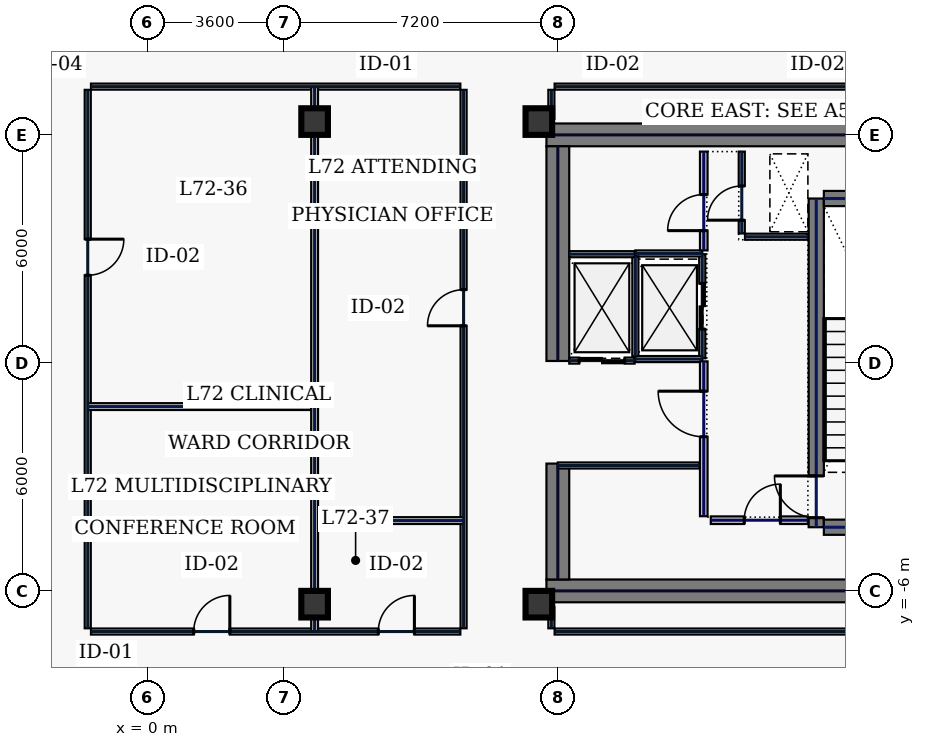
"""IFC4 building model, lengths in metres.
Left out: names, types, materials, properties, quantities, classifications, styles, units other than length and angle.
Written with IfcOpenShell. Run it as: python <this file> out.ifc"""

import sys

from ifc_helpers import new_model, si_unit, direction, frame, frame_2d, origin, origin_2d, place, context, subcontext, project, spatial, rectangle, hollow_rectangle, extrude, element, fill, save


model = new_model("IFC4")
c1 = context("Model", 3, precision=1e-05, world=origin(), true_north=direction((0.0, 1.0)))
c2 = subcontext(c1, "Body", "Model", "MODEL_VIEW")
j1 = project(units=[si_unit("LENGTHUNIT", "METRE"), si_unit("PLANEANGLEUNIT", "RADIAN")], contexts=[c1])
p1 = place(None, origin())
s1 = spatial("IfcSite", under=j1, at=p1, CompositionType="ELEMENT")
p2 = place(p1, origin())
s2 = spatial("IfcBuilding", under=s1, at=p2, CompositionType="ELEMENT")
p3 = place(p2, frame((0.0, 0.0, 309.0)))
s3 = spatial("IfcBuildingStorey", under=s2, at=p3, CompositionType="ELEMENT", Elevation=309.0)
for number, where, z_axis, x_axis in (
    (1, (10.5, 6.0, 0.0), (0.0, 0.0, 1.0), (1.0, 0.0, 0.0)),
    (2, (10.5, -6.0, 0.0), (0.0, 0.0, 1.0), (1.0, 0.0, 0.0)),
):
    element("IfcWall", number, at=place(p3, frame(where, z_axis=z_axis, x_axis=x_axis)), inside=s3, PredefinedType="SHEAR", context=c2, shape_type="SweptSolid", body=[
        extrude(rectangle(XDim=11.5, YDim=0.6, at=frame_2d((5.75, 0.0))), origin(), (0.0, 0.0, 1.0), 3.74),
    ])
p4 = place(p3, frame((10.8, -5.7, 0.0), z_axis=(0.0, 0.0, 1.0), x_axis=(0.0, 1.0, 0.0)))
e3 = element("IfcWall", 3, at=p4, inside=s3, PredefinedType="SHEAR", context=c2, shape_type="SweptSolid", body=[
    extrude(rectangle(XDim=3.05, YDim=0.6, at=frame_2d((1.525, 0.0))), origin(), (0.0, 0.0, 1.0), 3.74),
])
p5 = place(p3, frame((10.8, 0.05, 0.0), z_axis=(0.0, 0.0, 1.0), x_axis=(0.0, 1.0, 0.0)))
e4 = element("IfcWall", 4, at=p5, inside=s3, PredefinedType="SHEAR", context=c2, shape_type="SweptSolid", body=[
    extrude(rectangle(XDim=5.65, YDim=0.6, at=frame_2d((2.825, 0.0))), origin(), (0.0, 0.0, 1.0), 3.74),
])
p6 = place(p3, frame((17.6, -4.325, 0.0), z_axis=(0.0, 0.0, 1.0), x_axis=(0.0, 1.0, 0.0)))
e5 = element("IfcWall", 5, at=p6, inside=s3, PredefinedType="SHEAR", context=c2, shape_type="SweptSolid", body=[
    extrude(rectangle(XDim=8.65, YDim=0.4, at=frame_2d((4.325, 0.0))), origin(), (0.0, 0.0, 1.0), 3.74),
])
p7 = place(p6, frame((0.25, 0.0, 0.0)))
e6 = element("IfcOpeningElement", 6, at=p7, cuts=e5, PredefinedType="OPENING", context=c2, shape_type="SweptSolid", body=[
    extrude(rectangle(XDim=1.1, YDim=2.2, at=frame_2d((0.55, 1.1))), frame((0.0, 0.21, 0.0), z_axis=(0.0, -1.0, 0.0), x_axis=(1.0, 0.0, 0.0)), (0.0, 0.0, 1.0), 0.42),
])
for number, where, z_axis, x_axis in (
    (7, (17.8, -4.325, 0.0), (0.0, 0.0, 1.0), (1.0, 0.0, 0.0)),
    (8, (17.8, 4.325, 0.0), (0.0, 0.0, 1.0), (1.0, 0.0, 0.0)),
):
    element("IfcWall", number, at=place(p3, frame(where, z_axis=z_axis, x_axis=x_axis)), inside=s3, PredefinedType="SHEAR", context=c2, shape_type="SweptSolid", body=[
        extrude(rectangle(XDim=3.4, YDim=0.4, at=frame_2d((1.7, 0.0))), origin(), (0.0, 0.0, 1.0), 3.74),
    ])
for number, where, z_axis, x_axis in (
    (9, (10.3, -6.35, 0.0), (0.0, 0.0, 1.0), (1.0, 0.0, 0.0)),
    (10, (10.3, 6.35, 0.0), (0.0, 0.0, 1.0), (1.0, 0.0, 0.0)),
    (11, (4.4, -6.35, 0.0), (0.0, 0.0, 1.0), (1.0, 0.0, 0.0)),
    (12, (4.4, 6.35, 0.0), (0.0, 0.0, 1.0), (1.0, 0.0, 0.0)),
):
    element("IfcColumn", number, at=place(p3, frame(where, z_axis=z_axis, x_axis=x_axis)), inside=s3, PredefinedType="COLUMN", context=c2, shape_type="SweptSolid", body=[
        extrude(hollow_rectangle(XDim=0.7, YDim=0.7, WallThickness=0.032, at=origin_2d()), origin(), (0.0, 0.0, 1.0), 3.74),
    ])
p8 = place(p3, frame((14.6, 0.12, 0.0), z_axis=(0.0, 0.0, 1.0), x_axis=(0.0, 1.0, 0.0)))
e13 = element("IfcWall", 13, at=p8, inside=s3, PredefinedType="PARTITIONING", context=c2, shape_type="SweptSolid", body=[
    extrude(rectangle(XDim=2.74, YDim=0.16, at=frame_2d((1.37, 0.0))), origin(), (0.0, 0.0, 1.0), 3.74),
])
p9 = place(p8, frame((0.77, 0.0, 0.0)))
e14 = element("IfcOpeningElement", 14, at=p9, cuts=e13, PredefinedType="OPENING", context=c2, shape_type="SweptSolid", body=[
    extrude(rectangle(XDim=1.2, YDim=2.2, at=frame_2d((0.6, 1.1))), frame((0.0, 0.09, 0.0), z_axis=(0.0, -1.0, 0.0), x_axis=(1.0, 0.0, 0.0)), (0.0, 0.0, 1.0), 0.18),
])
for number, where, z_axis, x_axis in (
    (15, (12.84, 0.1, 0.0), (0.0, 0.0, 1.0), (1.0, 0.0, 0.0)),
    (16, (12.84, 2.88, 0.0), (0.0, 0.0, 1.0), (1.0, 0.0, 0.0)),
):
    element("IfcWall", number, at=place(p3, frame(where, z_axis=z_axis, x_axis=x_axis)), inside=s3, PredefinedType="PARTITIONING", context=c2, shape_type="SweptSolid", body=[
        extrude(rectangle(XDim=1.76, YDim=0.16, at=frame_2d((0.88, 0.0))), origin(), (0.0, 0.0, 1.0), 3.74),
    ])
p10 = place(p3, frame((12.84, 0.18, 0.0), z_axis=(0.0, 0.0, 1.0), x_axis=(0.0, 1.0, 0.0)))
e17 = element("IfcWall", 17, at=p10, inside=s3, PredefinedType="PARTITIONING", context=c2, shape_type="SweptSolid", body=[
    extrude(rectangle(XDim=2.62, YDim=0.16, at=frame_2d((1.31, 0.0))), origin(), (0.0, 0.0, 1.0), 3.74),
])
p11 = place(p3, frame((11.1, 0.06, 0.0), z_axis=(0.0, 0.0, 1.0), x_axis=(1.0, 0.0, 0.0)))
e18 = element("IfcWall", 18, at=p11, inside=s3, PredefinedType="PARTITIONING", context=c2, shape_type="SweptSolid", body=[
    extrude(rectangle(XDim=1.72, YDim=0.16, at=frame_2d((0.86, 0.0))), origin(), (0.0, 0.0, 1.0), 3.74),
])
p12 = place(p11, frame((0.26, 0.0, 0.0)))
e19 = element("IfcOpeningElement", 19, at=p12, cuts=e18, PredefinedType="OPENING", context=c2, shape_type="SweptSolid", body=[
    extrude(rectangle(XDim=1.2, YDim=2.2, at=frame_2d((0.6, 1.1))), frame((0.0, 0.09, 0.0), z_axis=(0.0, -1.0, 0.0), x_axis=(1.0, 0.0, 0.0)), (0.0, 0.0, 1.0), 0.18),
])
p13 = place(p3, frame((11.1, 2.86, 0.0), z_axis=(0.0, 0.0, 1.0), x_axis=(1.0, 0.0, 0.0)))
e20 = element("IfcWall", 20, at=p13, inside=s3, PredefinedType="PARTITIONING", context=c2, shape_type="SweptSolid", body=[
    extrude(rectangle(XDim=1.72, YDim=0.16, at=frame_2d((0.86, 0.0))), origin(), (0.0, 0.0, 1.0), 3.74),
])
p14 = place(p3, frame((15.64, 3.405, 0.0), z_axis=(0.0, 0.0, 1.0), x_axis=(0.0, 1.0, 0.0)))
e21 = element("IfcWall", 21, at=p14, inside=s3, PredefinedType="PARTITIONING", context=c2, shape_type="SweptSolid", body=[
    extrude(rectangle(XDim=2.155, YDim=0.16, at=frame_2d((1.078, 0.0))), origin(), (0.0, 0.0, 1.0), 3.74),
])
p15 = place(p14, frame((0.35, 0.0, 0.0)))
e22 = element("IfcOpeningElement", 22, at=p15, cuts=e21, PredefinedType="OPENING", context=c2, shape_type="SweptSolid", body=[
    extrude(rectangle(XDim=0.9, YDim=2.2, at=frame_2d((0.45, 1.1))), frame((0.0, 0.09, 0.0), z_axis=(0.0, -1.0, 0.0), x_axis=(1.0, 0.0, 0.0)), (0.0, 0.0, 1.0), 0.18),
])
p16 = place(p3, frame((15.725, 3.32, 0.0), z_axis=(0.0, 0.0, 1.0), x_axis=(1.0, 0.0, 0.0)))
e23 = element("IfcWall", 23, at=p16, inside=s3, PredefinedType="PARTITIONING", context=c2, shape_type="SweptSolid", body=[
    extrude(rectangle(XDim=1.655, YDim=0.16, at=frame_2d((0.827, 0.0))), origin(), (0.0, 0.0, 1.0), 3.74),
])
p17 = place(p3, frame((14.825, -4.14, 0.0), z_axis=(0.0, 0.0, 1.0), x_axis=(1.0, 0.0, 0.0)))
e24 = element("IfcWall", 24, at=p17, inside=s3, PredefinedType="SOLIDWALL", context=c2, shape_type="SweptSolid", body=[
    extrude(rectangle(XDim=2.555, YDim=0.2, at=frame_2d((1.277, 0.0))), origin(), (0.0, 0.0, 1.0), 3.74),
])
p18 = place(p17, frame((0.88, 0.0, 0.0)))
e25 = element("IfcOpeningElement", 25, at=p18, cuts=e24, PredefinedType="OPENING", context=c2, shape_type="SweptSolid", body=[
    extrude(rectangle(XDim=0.95, YDim=2.2, at=frame_2d((0.475, 1.1))), frame((0.0, 0.11, 0.0), z_axis=(0.0, -1.0, 0.0), x_axis=(1.0, 0.0, 0.0)), (0.0, 0.0, 1.0), 0.22),
])
p19 = place(p3, frame((10.8, -2.7, 0.0), z_axis=(0.0, 0.0, 1.0), x_axis=(1.0, 0.0, 0.0)))
e26 = element("IfcWall", 26, at=p19, inside=s3, PredefinedType="PARTITIONING", context=c2, shape_type="SweptSolid", body=[
    extrude(rectangle(XDim=3.735, YDim=0.16, at=frame_2d((1.867, 0.0))), origin(), (0.0, 0.0, 1.0), 3.74),
])
p20 = place(p3, frame((14.64, 2.96, 0.0), z_axis=(0.0, 0.0, 1.0), x_axis=(0.0, 1.0, 0.0)))
e27 = element("IfcWall", 27, at=p20, inside=s3, PredefinedType="SOLIDWALL", context=c2, shape_type="SweptSolid", body=[
    extrude(rectangle(XDim=2.6, YDim=0.2, at=frame_2d((1.3, 0.0))), origin(), (0.0, 0.0, 1.0), 3.74),
])
p21 = place(p20, frame((0.52, 0.0, 0.0)))
e28 = element("IfcOpeningElement", 28, at=p21, cuts=e27, PredefinedType="OPENING", context=c2, shape_type="SweptSolid", body=[
    extrude(rectangle(XDim=0.95, YDim=2.2, at=frame_2d((0.475, 1.1))), frame((0.0, 0.11, 0.0), z_axis=(0.0, -1.0, 0.0), x_axis=(1.0, 0.0, 0.0)), (0.0, 0.0, 1.0), 0.22),
])
p22 = place(p3, frame((14.64, -4.035, 0.0), z_axis=(0.0, 0.0, 1.0), x_axis=(0.0, 1.0, 0.0)))
e29 = element("IfcWall", 29, at=p22, inside=s3, PredefinedType="SOLIDWALL", context=c2, shape_type="SweptSolid", body=[
    extrude(rectangle(XDim=4.075, YDim=0.2, at=frame_2d((2.038, 0.0))), origin(), (0.0, 0.0, 1.0), 3.74),
])
p23 = place(p22, frame((2.09, 0.0, 0.0)))
e30 = element("IfcOpeningElement", 30, at=p23, cuts=e29, PredefinedType="OPENING", context=c2, shape_type="SweptSolid", body=[
    extrude(rectangle(XDim=1.2, YDim=2.2, at=frame_2d((0.6, 1.1))), frame((0.0, 0.11, 0.0), z_axis=(0.0, -1.0, 0.0), x_axis=(1.0, 0.0, 0.0)), (0.0, 0.0, 1.0), 0.22),
])
p24 = place(p3, frame((21.915, 7.27, 0.0), z_axis=(0.0, 0.0, 1.0), x_axis=(-1.0, 0.0, 0.0)))
e31 = element("IfcWall", 31, at=p24, inside=s3, PredefinedType="PARTITIONING", context=c2, shape_type="SweptSolid", body=[
    extrude(rectangle(XDim=11.2, YDim=0.16, at=frame_2d((5.6, 0.0))), origin(), (0.0, 0.0, 1.0), 3.74),
])
p25 = place(p3, frame((10.63, 7.185, 0.0), z_axis=(0.0, 0.0, 1.0), x_axis=(0.0, -1.0, 0.0)))
e32 = element("IfcWall", 32, at=p25, inside=s3, PredefinedType="PARTITIONING", context=c2, shape_type="SweptSolid", body=[
    extrude(rectangle(XDim=0.765, YDim=0.16, at=frame_2d((0.383, 0.0))), origin(), (0.0, 0.0, 1.0), 3.74),
])
p26 = place(p3, frame((10.63, -6.42, 0.0), z_axis=(0.0, 0.0, 1.0), x_axis=(0.0, -1.0, 0.0)))
e33 = element("IfcWall", 33, at=p26, inside=s3, PredefinedType="PARTITIONING", context=c2, shape_type="SweptSolid", body=[
    extrude(rectangle(XDim=0.565, YDim=0.16, at=frame_2d((0.283, 0.0))), origin(), (0.0, 0.0, 1.0), 3.74),
])
p27 = place(p3, frame((10.715, -7.07, 0.0), z_axis=(0.0, 0.0, 1.0), x_axis=(1.0, 0.0, 0.0)))
e34 = element("IfcWall", 34, at=p27, inside=s3, PredefinedType="PARTITIONING", context=c2, shape_type="SweptSolid", body=[
    extrude(rectangle(XDim=11.2, YDim=0.16, at=frame_2d((5.6, 0.0))), origin(), (0.0, 0.0, 1.0), 3.74),
])
p28 = place(p3, frame((8.235, 7.27, 0.0), z_axis=(0.0, 0.0, 1.0), x_axis=(-1.0, 0.0, 0.0)))
e35 = element("IfcWall", 35, at=p28, inside=s3, PredefinedType="PARTITIONING", context=c2, shape_type="SweptSolid", body=[
    extrude(rectangle(XDim=9.72, YDim=0.16, at=frame_2d((4.86, 0.0))), origin(), (0.0, 0.0, 1.0), 3.74),
])
p29 = place(p3, frame((-1.57, 7.185, 0.0), z_axis=(0.0, 0.0, 1.0), x_axis=(0.0, -1.0, 0.0)))
e36 = element("IfcWall", 36, at=p29, inside=s3, PredefinedType="PARTITIONING", context=c2, shape_type="SweptSolid", body=[
    extrude(rectangle(XDim=14.17, YDim=0.16, at=frame_2d((7.085, 0.0))), origin(), (0.0, 0.0, 1.0), 3.74),
])
p30 = place(p29, frame((3.929, 0.0, 0.0)))
e37 = element("IfcOpeningElement", 37, at=p30, cuts=e36, PredefinedType="OPENING", context=c2, shape_type="SweptSolid", body=[
    extrude(rectangle(XDim=0.95, YDim=2.2, at=frame_2d((0.475, 1.1))), frame((0.0, 0.09, 0.0), z_axis=(0.0, -1.0, 0.0), x_axis=(1.0, 0.0, 0.0)), (0.0, 0.0, 1.0), 0.18),
])
p31 = place(p3, frame((-1.485, -7.07, 0.0), z_axis=(0.0, 0.0, 1.0), x_axis=(1.0, 0.0, 0.0)))
e38 = element("IfcWall", 38, at=p31, inside=s3, PredefinedType="PARTITIONING", context=c2, shape_type="SweptSolid", body=[
    extrude(rectangle(XDim=9.72, YDim=0.16, at=frame_2d((4.86, 0.0))), origin(), (0.0, 0.0, 1.0), 3.74),
])
p32 = place(p31, frame((2.704, 0.0, 0.0)))
e39 = element("IfcOpeningElement", 39, at=p32, cuts=e38, PredefinedType="OPENING", context=c2, shape_type="SweptSolid", body=[
    extrude(rectangle(XDim=0.95, YDim=2.2, at=frame_2d((0.475, 1.1))), frame((0.0, 0.09, 0.0), z_axis=(0.0, -1.0, 0.0), x_axis=(1.0, 0.0, 0.0)), (0.0, 0.0, 1.0), 0.18),
])
p33 = place(p31, frame((7.561, 0.0, 0.0)))
e40 = element("IfcOpeningElement", 40, at=p33, cuts=e38, PredefinedType="OPENING", context=c2, shape_type="SweptSolid", body=[
    extrude(rectangle(XDim=0.95, YDim=2.2, at=frame_2d((0.475, 1.1))), frame((0.0, 0.09, 0.0), z_axis=(0.0, -1.0, 0.0), x_axis=(1.0, 0.0, 0.0)), (0.0, 0.0, 1.0), 0.18),
])
p34 = place(p3, frame((8.32, -6.985, 0.0), z_axis=(0.0, 0.0, 1.0), x_axis=(0.0, 1.0, 0.0)))
e41 = element("IfcWall", 41, at=p34, inside=s3, PredefinedType="PARTITIONING", context=c2, shape_type="SweptSolid", body=[
    extrude(rectangle(XDim=14.17, YDim=0.16, at=frame_2d((7.085, 0.0))), origin(), (0.0, 0.0, 1.0), 3.74),
])
p35 = place(p34, frame((7.961, 0.0, 0.0)))
e42 = element("IfcOpeningElement", 42, at=p35, cuts=e41, PredefinedType="OPENING", context=c2, shape_type="SweptSolid", body=[
    extrude(rectangle(XDim=0.95, YDim=2.2, at=frame_2d((0.475, 1.1))), frame((0.0, 0.09, 0.0), z_axis=(0.0, -1.0, 0.0), x_axis=(1.0, 0.0, 0.0)), (0.0, 0.0, 1.0), 0.18),
])
p36 = place(p3, frame((4.4, -7.065, 0.0), z_axis=(0.0, 0.0, 1.0), x_axis=(0.0, 1.0, 0.0)))
e43 = element("IfcWall", 43, at=p36, inside=s3, PredefinedType="PARTITIONING", context=c2, shape_type="SweptSolid", body=[
    extrude(rectangle(XDim=14.33, YDim=0.18, at=frame_2d((7.165, 0.0))), origin(), (0.0, 0.0, 1.0), 1.535),
])
p37 = place(p3, frame((-1.565, -1.15, 0.0), z_axis=(0.0, 0.0, 1.0), x_axis=(1.0, 0.0, 0.0)))
e44 = element("IfcWall", 44, at=p37, inside=s3, PredefinedType="PARTITIONING", context=c2, shape_type="SweptSolid", body=[
    extrude(rectangle(XDim=5.87, YDim=0.18, at=frame_2d((2.935, 0.0))), origin(), (0.0, 0.0, 1.0), 3.74),
])
p38 = place(p3, frame((4.495, -4.15, 0.0), z_axis=(0.0, 0.0, 1.0), x_axis=(1.0, 0.0, 0.0)))
e45 = element("IfcWall", 45, at=p38, inside=s3, PredefinedType="PARTITIONING", context=c2, shape_type="SweptSolid", body=[
    extrude(rectangle(XDim=3.82, YDim=0.18, at=frame_2d((1.91, 0.0))), origin(), (0.0, 0.0, 1.0), 3.74),
])
p39 = place(p7, origin())
e46 = element("IfcDoor", 46, at=p39, inside=s3, OperationType="SINGLE_SWING_RIGHT", PredefinedType="DOOR", context=c2, shape_type="SweptSolid", body=[
    extrude(rectangle(XDim=1.1, YDim=2.2, at=frame_2d((0.55, 1.1))), frame((0.0, 0.025, 0.0), z_axis=(0.0, -1.0, 0.0), x_axis=(1.0, 0.0, 0.0)), (0.0, 0.0, 1.0), 0.05),
])
fill(e6, e46)
p40 = place(p9, origin())
e47 = element("IfcDoor", 47, at=p40, inside=s3, OperationType="SLIDING_TO_LEFT", PredefinedType="DOOR", context=c2, shape_type="SweptSolid", body=[
    extrude(rectangle(XDim=1.2, YDim=2.2, at=frame_2d((0.6, 1.1))), frame((0.0, 0.025, 0.0), z_axis=(0.0, -1.0, 0.0), x_axis=(1.0, 0.0, 0.0)), (0.0, 0.0, 1.0), 0.05),
])
fill(e14, e47)
p41 = place(p12, origin())
e48 = element("IfcDoor", 48, at=p41, inside=s3, OperationType="SLIDING_TO_LEFT", PredefinedType="DOOR", context=c2, shape_type="SweptSolid", body=[
    extrude(rectangle(XDim=1.2, YDim=2.2, at=frame_2d((0.6, 1.1))), frame((0.0, 0.025, 0.0), z_axis=(0.0, -1.0, 0.0), x_axis=(1.0, 0.0, 0.0)), (0.0, 0.0, 1.0), 0.05),
])
fill(e19, e48)
p42 = place(p15, origin())
e49 = element("IfcDoor", 49, at=p42, inside=s3, OperationType="SINGLE_SWING_LEFT", PredefinedType="DOOR", context=c2, shape_type="SweptSolid", body=[
    extrude(rectangle(XDim=0.9, YDim=2.2, at=frame_2d((0.45, 1.1))), frame((0.0, 0.025, 0.0), z_axis=(0.0, -1.0, 0.0), x_axis=(1.0, 0.0, 0.0)), (0.0, 0.0, 1.0), 0.05),
])
fill(e22, e49)
p43 = place(p18, origin())
e50 = element("IfcDoor", 50, at=p43, inside=s3, OperationType="SINGLE_SWING_RIGHT", PredefinedType="DOOR", context=c2, shape_type="SweptSolid", body=[
    extrude(rectangle(XDim=0.95, YDim=2.2, at=frame_2d((0.475, 1.1))), frame((0.0, 0.025, 0.0), z_axis=(0.0, -1.0, 0.0), x_axis=(1.0, 0.0, 0.0)), (0.0, 0.0, 1.0), 0.05),
])
fill(e25, e50)
p44 = place(p21, origin())
e51 = element("IfcDoor", 51, at=p44, inside=s3, OperationType="SINGLE_SWING_LEFT", PredefinedType="DOOR", context=c2, shape_type="SweptSolid", body=[
    extrude(rectangle(XDim=0.95, YDim=2.2, at=frame_2d((0.475, 1.1))), frame((0.0, 0.025, 0.0), z_axis=(0.0, -1.0, 0.0), x_axis=(1.0, 0.0, 0.0)), (0.0, 0.0, 1.0), 0.05),
])
fill(e28, e51)
p45 = place(p23, origin())
e52 = element("IfcDoor", 52, at=p45, inside=s3, OperationType="SINGLE_SWING_RIGHT", PredefinedType="DOOR", context=c2, shape_type="SweptSolid", body=[
    extrude(rectangle(XDim=1.2, YDim=2.2, at=frame_2d((0.6, 1.1))), frame((0.0, 0.025, 0.0), z_axis=(0.0, -1.0, 0.0), x_axis=(1.0, 0.0, 0.0)), (0.0, 0.0, 1.0), 0.05),
])
fill(e30, e52)
p46 = place(p32, origin())
e53 = element("IfcDoor", 53, at=p46, inside=s3, OperationType="SINGLE_SWING_RIGHT", PredefinedType="DOOR", context=c2, shape_type="SweptSolid", body=[
    extrude(rectangle(XDim=0.95, YDim=2.2, at=frame_2d((0.475, 1.1))), frame((0.0, 0.025, 0.0), z_axis=(0.0, -1.0, 0.0), x_axis=(1.0, 0.0, 0.0)), (0.0, 0.0, 1.0), 0.05),
])
fill(e39, e53)
p47 = place(p30, origin())
e54 = element("IfcDoor", 54, at=p47, inside=s3, OperationType="SINGLE_SWING_LEFT", PredefinedType="DOOR", context=c2, shape_type="SweptSolid", body=[
    extrude(rectangle(XDim=0.95, YDim=2.2, at=frame_2d((0.475, 1.1))), frame((0.0, 0.025, 0.0), z_axis=(0.0, -1.0, 0.0), x_axis=(1.0, 0.0, 0.0)), (0.0, 0.0, 1.0), 0.05),
])
fill(e37, e54)
p48 = place(p33, origin())
e55 = element("IfcDoor", 55, at=p48, inside=s3, OperationType="SINGLE_SWING_RIGHT", PredefinedType="DOOR", context=c2, shape_type="SweptSolid", body=[
    extrude(rectangle(XDim=0.95, YDim=2.2, at=frame_2d((0.475, 1.1))), frame((0.0, 0.025, 0.0), z_axis=(0.0, -1.0, 0.0), x_axis=(1.0, 0.0, 0.0)), (0.0, 0.0, 1.0), 0.05),
])
fill(e40, e55)
p49 = place(p35, origin())
e56 = element("IfcDoor", 56, at=p49, inside=s3, OperationType="SINGLE_SWING_LEFT", PredefinedType="DOOR", context=c2, shape_type="SweptSolid", body=[
    extrude(rectangle(XDim=0.95, YDim=2.2, at=frame_2d((0.475, 1.1))), frame((0.0, 0.025, 0.0), z_axis=(0.0, -1.0, 0.0), x_axis=(1.0, 0.0, 0.0)), (0.0, 0.0, 1.0), 0.05),
])
fill(e42, e56)
save(model, sys.argv[1])
